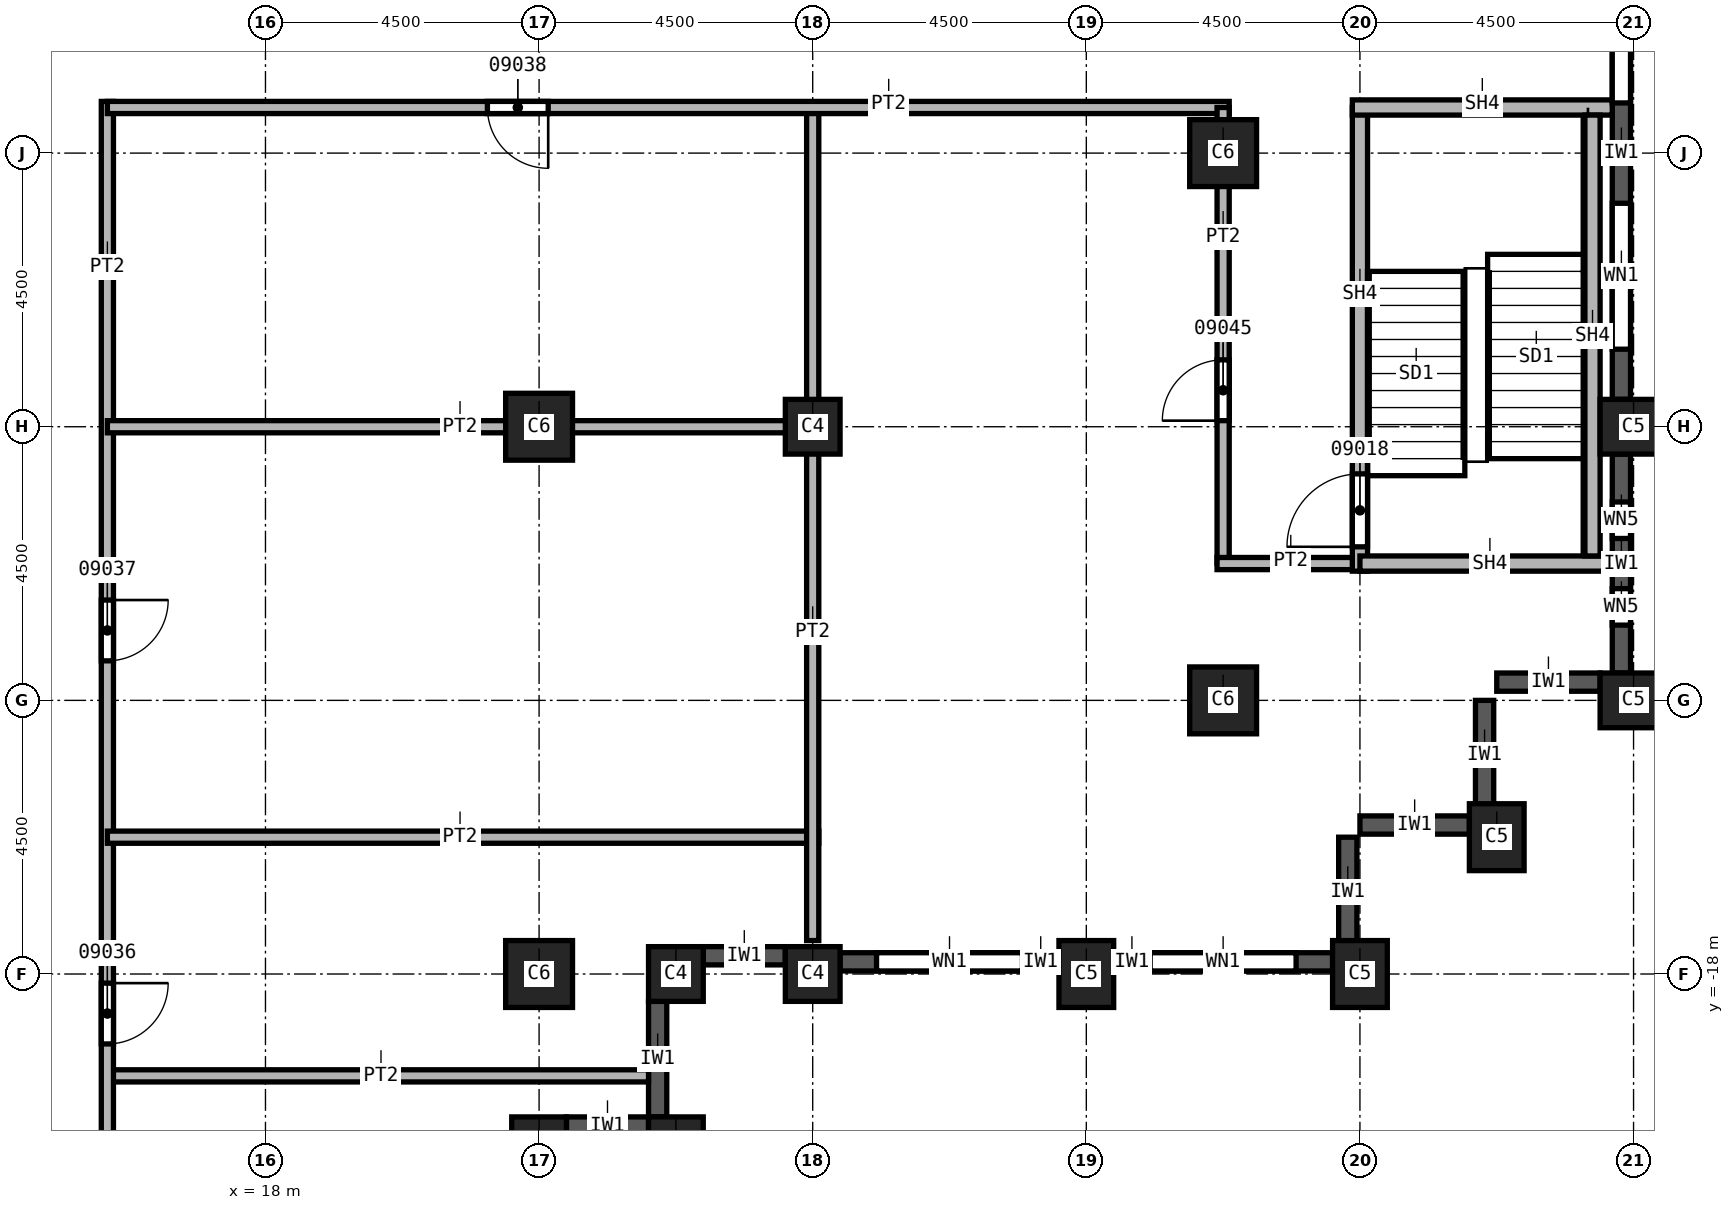
"""IFC4 building model, lengths in metres.
Left out: names, types, materials, properties, quantities, classifications, styles, units other than length and angle.
Written with IfcOpenShell. Run it as: python <this file> out.ifc"""

import sys

from ifc_helpers import new_model, si_unit, direction, frame, frame_2d, origin, origin_2d, place, context, subcontext, project, spatial, rectangle, extrude, element, fill, save


model = new_model("IFC4")
c1 = context("Model", 3, precision=1e-05, world=origin(), true_north=direction((0.0, 1.0)))
c2 = subcontext(c1, "Body", "Model", "MODEL_VIEW")
j1 = project(units=[si_unit("LENGTHUNIT", "METRE"), si_unit("PLANEANGLEUNIT", "RADIAN")], contexts=[c1])
p1 = place(None, origin())
s1 = spatial("IfcSite", under=j1, at=p1, CompositionType="ELEMENT")
p2 = place(p1, origin())
s2 = spatial("IfcBuilding", under=s1, at=p2, CompositionType="ELEMENT")
p3 = place(p2, frame((0.0, 0.0, 166.0)))
s3 = spatial("IfcBuildingStorey", under=s2, at=p3, CompositionType="ELEMENT", Elevation=166.0)
for number, where, z_axis, x_axis in (
    (1, (40.5, -9.0, 0.0), (0.0, 0.0, 1.0), (0.0, 1.0, 0.0)),
    (2, (40.5, -13.5, 0.0), (0.0, 0.0, 1.0), (0.0, 1.0, 0.0)),
    (3, (38.25, -15.75, 0.0), (0.0, 0.0, 1.0), (1.0, 0.0, 0.0)),
    (4, (31.5, -18.0, 0.0), (0.0, 0.0, 1.0), (1.0, 0.0, 0.0)),
    (5, (36.0, -18.0, 0.0), (0.0, 0.0, 1.0), (1.0, 0.0, 0.0)),
):
    element("IfcColumn", number, at=place(p3, frame(where, z_axis=z_axis, x_axis=x_axis)), inside=s3, PredefinedType="COLUMN", context=c2, shape_type="SweptSolid", body=[
        extrude(rectangle(XDim=0.9, YDim=1.1, at=origin_2d()), origin(), (0.0, 0.0, 1.0), 3.7),
    ])
for number, where, z_axis, x_axis in (
    (6, (33.75, -4.5, 0.0), (0.0, 0.0, 1.0), (1.0, 0.0, 0.0)),
    (7, (33.75, -13.5, 0.0), (0.0, 0.0, 1.0), (1.0, 0.0, 0.0)),
    (8, (22.5, -9.0, 0.0), (0.0, 0.0, 1.0), (1.0, 0.0, 0.0)),
    (9, (22.5, -18.0, 0.0), (0.0, 0.0, 1.0), (1.0, 0.0, 0.0)),
):
    element("IfcColumn", number, at=place(p3, frame(where, z_axis=z_axis, x_axis=x_axis)), inside=s3, PredefinedType="COLUMN", context=c2, shape_type="SweptSolid", body=[
        extrude(rectangle(XDim=1.1, YDim=1.1, at=origin_2d()), origin(), (0.0, 0.0, 1.0), 3.7),
    ])
for number, where, z_axis, x_axis in (
    (10, (27.0, -9.0, 0.0), (0.0, 0.0, 1.0), (1.0, 0.0, 0.0)),
    (11, (27.0, -18.0, 0.0), (0.0, 0.0, 1.0), (1.0, 0.0, 0.0)),
    (12, (22.5, -20.8, 0.0), (0.0, 0.0, 1.0), (1.0, 0.0, 0.0)),
    (13, (24.75, -20.8, 0.0), (0.0, 0.0, 1.0), (1.0, 0.0, 0.0)),
    (14, (24.75, -18.0, 0.0), (0.0, 0.0, 1.0), (1.0, 0.0, 0.0)),
):
    element("IfcColumn", number, at=place(p3, frame(where, z_axis=z_axis, x_axis=x_axis)), inside=s3, PredefinedType="COLUMN", context=c2, shape_type="SweptSolid", body=[
        extrude(rectangle(XDim=0.9, YDim=0.9, at=origin_2d()), origin(), (0.0, 0.0, 1.0), 3.7),
    ])
for number, where, z_axis, x_axis in (
    (15, (35.8, -17.55, 0.0), (0.0, 0.0, 1.0), (0.0, 1.0, 0.0)),
    (16, (37.8, -15.55, 0.0), (0.0, 0.0, 1.0), (-1.0, 0.0, 0.0)),
    (17, (38.05, -15.3, 0.0), (0.0, 0.0, 1.0), (0.0, 1.0, 0.0)),
):
    element("IfcWall", number, at=place(p3, frame(where, z_axis=z_axis, x_axis=x_axis)), inside=s3, PredefinedType="SOLIDWALL", context=c2, shape_type="SweptSolid", body=[
        extrude(rectangle(XDim=1.8, YDim=0.3, at=frame_2d((0.9, 0.0))), origin(), (0.0, 0.0, 1.0), 3.1),
    ])
p4 = place(p3, frame((39.95, -13.2, 0.0), z_axis=(0.0, 0.0, 1.0), x_axis=(-1.0, 0.0, 0.0)))
e18 = element("IfcWall", 18, at=p4, inside=s3, PredefinedType="SOLIDWALL", context=c2, shape_type="SweptSolid", body=[
    extrude(rectangle(XDim=1.7, YDim=0.3, at=frame_2d((0.85, 0.0))), origin(), (0.0, 0.0, 1.0), 3.1),
])
p5 = place(p3, frame((22.95, -20.5, 0.0), z_axis=(0.0, 0.0, 1.0), x_axis=(1.0, 0.0, 0.0)))
e19 = element("IfcWall", 19, at=p5, inside=s3, PredefinedType="SOLIDWALL", context=c2, shape_type="SweptSolid", body=[
    extrude(rectangle(XDim=1.35, YDim=0.3, at=frame_2d((0.675, 0.0))), origin(), (0.0, 0.0, 1.0), 3.1),
])
p6 = place(p3, frame((24.45, -20.35, 0.0), z_axis=(0.0, 0.0, 1.0), x_axis=(0.0, 1.0, 0.0)))
e20 = element("IfcWall", 20, at=p6, inside=s3, PredefinedType="SOLIDWALL", context=c2, shape_type="SweptSolid", body=[
    extrude(rectangle(XDim=1.9, YDim=0.3, at=frame_2d((0.95, 0.0))), origin(), (0.0, 0.0, 1.0), 3.1),
])
p7 = place(p3, frame((25.2, -17.7, 0.0), z_axis=(0.0, 0.0, 1.0), x_axis=(1.0, 0.0, 0.0)))
e21 = element("IfcWall", 21, at=p7, inside=s3, PredefinedType="SOLIDWALL", context=c2, shape_type="SweptSolid", body=[
    extrude(rectangle(XDim=1.35, YDim=0.3, at=frame_2d((0.675, 0.0))), origin(), (0.0, 0.0, 1.0), 3.1),
])
p8 = place(p3, frame((27.45, -17.8, 0.0), z_axis=(0.0, 0.0, 1.0), x_axis=(1.0, 0.0, 0.0)))
e22 = element("IfcWall", 22, at=p8, inside=s3, PredefinedType="SOLIDWALL", context=c2, shape_type="SweptSolid", body=[
    extrude(rectangle(XDim=3.6, YDim=0.3, at=frame_2d((1.8, 0.0))), origin(), (0.0, 0.0, 1.0), 3.1),
])
p9 = place(p8, frame((0.6, 0.0, 0.8)))
e23 = element("IfcOpeningElement", 23, at=p9, cuts=e22, PredefinedType="OPENING", context=c2, shape_type="SweptSolid", body=[
    extrude(rectangle(XDim=2.4, YDim=1.95, at=frame_2d((1.2, 0.975))), frame((0.0, 0.15, 0.0), z_axis=(0.0, -1.0, 0.0), x_axis=(1.0, 0.0, 0.0)), (0.0, 0.0, 1.0), 0.3),
])
p10 = place(p3, frame((31.95, -17.8, 0.0), z_axis=(0.0, 0.0, 1.0), x_axis=(1.0, 0.0, 0.0)))
e24 = element("IfcWall", 24, at=p10, inside=s3, PredefinedType="SOLIDWALL", context=c2, shape_type="SweptSolid", body=[
    extrude(rectangle(XDim=3.6, YDim=0.3, at=frame_2d((1.8, 0.0))), origin(), (0.0, 0.0, 1.0), 3.1),
])
p11 = place(p10, frame((0.6, 0.0, 0.8)))
e25 = element("IfcOpeningElement", 25, at=p11, cuts=e24, PredefinedType="OPENING", context=c2, shape_type="SweptSolid", body=[
    extrude(rectangle(XDim=2.4, YDim=1.95, at=frame_2d((1.2, 0.975))), frame((0.0, 0.15, 0.0), z_axis=(0.0, -1.0, 0.0), x_axis=(1.0, 0.0, 0.0)), (0.0, 0.0, 1.0), 0.3),
])
p12 = place(p3, frame((40.3, -13.05, 0.0), z_axis=(0.0, 0.0, 1.0), x_axis=(0.0, 1.0, 0.0)))
e26 = element("IfcWall", 26, at=p12, inside=s3, PredefinedType="SOLIDWALL", context=c2, shape_type="SweptSolid", body=[
    extrude(rectangle(XDim=3.6, YDim=0.3, at=frame_2d((1.8, 0.0))), origin(), (0.0, 0.0, 1.0), 3.1),
])
p13 = place(p12, frame((0.788, 0.0, 0.8)))
e27 = element("IfcOpeningElement", 27, at=p13, cuts=e26, PredefinedType="OPENING", context=c2, shape_type="SweptSolid", body=[
    extrude(rectangle(XDim=0.6, YDim=1.95, at=frame_2d((0.3, 0.975))), frame((0.0, 0.15, 0.0), z_axis=(0.0, -1.0, 0.0), x_axis=(1.0, 0.0, 0.0)), (0.0, 0.0, 1.0), 0.3),
])
p14 = place(p12, frame((2.212, 0.0, 0.8)))
e28 = element("IfcOpeningElement", 28, at=p14, cuts=e26, PredefinedType="OPENING", context=c2, shape_type="SweptSolid", body=[
    extrude(rectangle(XDim=0.6, YDim=1.95, at=frame_2d((0.3, 0.975))), frame((0.0, 0.15, 0.0), z_axis=(0.0, -1.0, 0.0), x_axis=(1.0, 0.0, 0.0)), (0.0, 0.0, 1.0), 0.3),
])
p15 = place(p3, frame((40.3, -8.55, 0.0), z_axis=(0.0, 0.0, 1.0), x_axis=(0.0, 1.0, 0.0)))
e29 = element("IfcWall", 29, at=p15, inside=s3, PredefinedType="SOLIDWALL", context=c2, shape_type="SweptSolid", body=[
    extrude(rectangle(XDim=8.1, YDim=0.3, at=frame_2d((4.05, 0.0))), origin(), (0.0, 0.0, 1.0), 3.1),
])
p16 = place(p15, frame((0.825, 0.0, 0.8)))
e30 = element("IfcOpeningElement", 30, at=p16, cuts=e29, PredefinedType="OPENING", context=c2, shape_type="SweptSolid", body=[
    extrude(rectangle(XDim=2.4, YDim=1.95, at=frame_2d((1.2, 0.975))), frame((0.0, 0.15, 0.0), z_axis=(0.0, -1.0, 0.0), x_axis=(1.0, 0.0, 0.0)), (0.0, 0.0, 1.0), 0.3),
])
p17 = place(p15, frame((4.875, 0.0, 0.8)))
e31 = element("IfcOpeningElement", 31, at=p17, cuts=e29, PredefinedType="OPENING", context=c2, shape_type="SweptSolid", body=[
    extrude(rectangle(XDim=2.4, YDim=1.95, at=frame_2d((1.2, 0.975))), frame((0.0, 0.15, 0.0), z_axis=(0.0, -1.0, 0.0), x_axis=(1.0, 0.0, 0.0)), (0.0, 0.0, 1.0), 0.3),
])
p18 = place(p3, frame((15.4, -19.675, 0.0), z_axis=(0.0, 0.0, 1.0), x_axis=(1.0, 0.0, 0.0)))
e32 = element("IfcWall", 32, at=p18, inside=s3, PredefinedType="PARTITIONING", context=c2, shape_type="SweptSolid", body=[
    extrude(rectangle(XDim=8.9, YDim=0.2, at=frame_2d((4.45, 0.0))), origin(), (0.0, 0.0, 1.0), 3.7),
])
p19 = place(p3, frame((15.4, -3.65, 0.0), z_axis=(0.0, 0.0, 1.0), x_axis=(0.0, -1.0, 0.0)))
e33 = element("IfcWall", 33, at=p19, inside=s3, PredefinedType="PARTITIONING", context=c2, shape_type="SweptSolid", body=[
    extrude(rectangle(XDim=19.6, YDim=0.2, at=frame_2d((9.8, 0.0))), origin(), (0.0, 0.0, 1.0), 3.7),
])
p20 = place(p19, frame((18.275, 0.0, 0.0)))
e34 = element("IfcOpeningElement", 34, at=p20, cuts=e33, PredefinedType="OPENING", context=c2, shape_type="SweptSolid", body=[
    extrude(rectangle(XDim=1.0, YDim=2.1, at=frame_2d((0.5, 1.05))), frame((0.0, 0.1, 0.0), z_axis=(0.0, -1.0, 0.0), x_axis=(1.0, 0.0, 0.0)), (0.0, 0.0, 1.0), 0.2),
])
p21 = place(p19, frame((14.5, 0.0, 0.0)))
e35 = element("IfcOpeningElement", 35, at=p21, cuts=e33, PredefinedType="OPENING", context=c2, shape_type="SweptSolid", body=[
    extrude(rectangle(XDim=1.0, YDim=2.1, at=frame_2d((0.5, 1.05))), frame((0.0, 0.1, 0.0), z_axis=(0.0, -1.0, 0.0), x_axis=(1.0, 0.0, 0.0)), (0.0, 0.0, 1.0), 0.2),
])
p22 = place(p19, frame((8.2, 0.0, 0.0)))
e36 = element("IfcOpeningElement", 36, at=p22, cuts=e33, PredefinedType="OPENING", context=c2, shape_type="SweptSolid", body=[
    extrude(rectangle(XDim=1.0, YDim=2.1, at=frame_2d((0.5, 1.05))), frame((0.0, 0.1, 0.0), z_axis=(0.0, -1.0, 0.0), x_axis=(1.0, 0.0, 0.0)), (0.0, 0.0, 1.0), 0.2),
])
for number, where, z_axis, x_axis in (
    (37, (15.4, -15.75, 0.0), (0.0, 0.0, 1.0), (1.0, 0.0, 0.0)),
    (38, (15.4, -9.0, 0.0), (0.0, 0.0, 1.0), (1.0, 0.0, 0.0)),
):
    element("IfcWall", number, at=place(p3, frame(where, z_axis=z_axis, x_axis=x_axis)), inside=s3, PredefinedType="PARTITIONING", context=c2, shape_type="SweptSolid", body=[
        extrude(rectangle(XDim=11.7, YDim=0.2, at=frame_2d((5.85, 0.0))), origin(), (0.0, 0.0, 1.0), 3.7),
    ])
p23 = place(p3, frame((27.0, -3.75, 0.0), z_axis=(0.0, 0.0, 1.0), x_axis=(0.0, -1.0, 0.0)))
e39 = element("IfcWall", 39, at=p23, inside=s3, PredefinedType="PARTITIONING", context=c2, shape_type="SweptSolid", body=[
    extrude(rectangle(XDim=13.7, YDim=0.2, at=frame_2d((6.85, 0.0))), origin(), (0.0, 0.0, 1.0), 3.7),
])
p24 = place(p3, frame((33.85, -3.75, 0.0), z_axis=(0.0, 0.0, 1.0), x_axis=(-1.0, 0.0, 0.0)))
e40 = element("IfcWall", 40, at=p24, inside=s3, PredefinedType="PARTITIONING", context=c2, shape_type="SweptSolid", body=[
    extrude(rectangle(XDim=18.45, YDim=0.2, at=frame_2d((9.225, 0.0))), origin(), (0.0, 0.0, 1.0), 3.7),
])
p25 = place(p24, frame((11.2, 0.0, 0.0)))
e41 = element("IfcOpeningElement", 41, at=p25, cuts=e40, PredefinedType="OPENING", context=c2, shape_type="SweptSolid", body=[
    extrude(rectangle(XDim=1.0, YDim=2.1, at=frame_2d((0.5, 1.05))), frame((0.0, 0.1, 0.0), z_axis=(0.0, -1.0, 0.0), x_axis=(1.0, 0.0, 0.0)), (0.0, 0.0, 1.0), 0.2),
])
p26 = place(p3, frame((33.75, -11.25, 0.0), z_axis=(0.0, 0.0, 1.0), x_axis=(0.0, 1.0, 0.0)))
e42 = element("IfcWall", 42, at=p26, inside=s3, PredefinedType="PARTITIONING", context=c2, shape_type="SweptSolid", body=[
    extrude(rectangle(XDim=7.5, YDim=0.2, at=frame_2d((3.75, 0.0))), origin(), (0.0, 0.0, 1.0), 3.7),
])
p27 = place(p26, frame((2.35, 0.0, 0.0)))
e43 = element("IfcOpeningElement", 43, at=p27, cuts=e42, PredefinedType="OPENING", context=c2, shape_type="SweptSolid", body=[
    extrude(rectangle(XDim=1.0, YDim=2.1, at=frame_2d((0.5, 1.05))), frame((0.0, 0.1, 0.0), z_axis=(0.0, -1.0, 0.0), x_axis=(1.0, 0.0, 0.0)), (0.0, 0.0, 1.0), 0.2),
])
p28 = place(p3, frame((36.0, -11.25, 0.0), z_axis=(0.0, 0.0, 1.0), x_axis=(-1.0, 0.0, 0.0)))
e44 = element("IfcWall", 44, at=p28, inside=s3, PredefinedType="PARTITIONING", context=c2, shape_type="SweptSolid", body=[
    extrude(rectangle(XDim=2.35, YDim=0.2, at=frame_2d((1.175, 0.0))), origin(), (0.0, 0.0, 1.0), 3.7),
])
p29 = place(p3, frame((36.0, -11.375, 0.0), z_axis=(0.0, 0.0, 1.0), x_axis=(0.0, 1.0, 0.0)))
e45 = element("IfcWall", 45, at=p29, inside=s3, PredefinedType="SOLIDWALL", context=c2, shape_type="SweptSolid", body=[
    extrude(rectangle(XDim=7.625, YDim=0.25, at=frame_2d((3.812, 0.0))), origin(), (0.0, 0.0, 1.0), 3.7),
])
p30 = place(p29, frame((0.4, 0.0, 0.0)))
e46 = element("IfcOpeningElement", 46, at=p30, cuts=e45, PredefinedType="OPENING", context=c2, shape_type="SweptSolid", body=[
    extrude(rectangle(XDim=1.2, YDim=2.1, at=frame_2d((0.6, 1.05))), frame((0.0, 0.125, 0.0), z_axis=(0.0, -1.0, 0.0), x_axis=(1.0, 0.0, 0.0)), (0.0, 0.0, 1.0), 0.25),
])
p31 = place(p3, frame((40.15, -11.25, 0.0), z_axis=(0.0, 0.0, 1.0), x_axis=(-1.0, 0.0, 0.0)))
e47 = element("IfcWall", 47, at=p31, inside=s3, PredefinedType="SOLIDWALL", context=c2, shape_type="SweptSolid", body=[
    extrude(rectangle(XDim=4.15, YDim=0.25, at=frame_2d((2.075, 0.0))), origin(), (0.0, 0.0, 1.0), 3.7),
])
p32 = place(p3, frame((40.15, -3.75, 0.0), z_axis=(0.0, 0.0, 1.0), x_axis=(-1.0, 0.0, 0.0)))
e48 = element("IfcWall", 48, at=p32, inside=s3, PredefinedType="SOLIDWALL", context=c2, shape_type="SweptSolid", body=[
    extrude(rectangle(XDim=4.275, YDim=0.25, at=frame_2d((2.137, 0.0))), origin(), (0.0, 0.0, 1.0), 3.7),
])
p33 = place(p3, frame((39.825, -11.125, 0.0), z_axis=(0.0, 0.0, 1.0), x_axis=(0.0, 1.0, 0.0)))
e49 = element("IfcWall", 49, at=p33, inside=s3, PredefinedType="SOLIDWALL", context=c2, shape_type="SweptSolid", body=[
    extrude(rectangle(XDim=7.25, YDim=0.25, at=frame_2d((3.625, 0.0))), origin(), (0.0, 0.0, 1.0), 3.7),
])
p34 = place(p9, origin())
e50 = element("IfcWindow", 50, at=p34, inside=s3, PartitioningType="SINGLE_PANEL", PredefinedType="WINDOW", context=c2, shape_type="SweptSolid", body=[
    extrude(rectangle(XDim=2.4, YDim=1.95, at=frame_2d((1.2, 0.975))), frame((0.0, 0.03, 0.0), z_axis=(0.0, -1.0, 0.0), x_axis=(1.0, 0.0, 0.0)), (0.0, 0.0, 1.0), 0.06),
])
fill(e23, e50)
p35 = place(p11, origin())
e51 = element("IfcWindow", 51, at=p35, inside=s3, PartitioningType="SINGLE_PANEL", PredefinedType="WINDOW", context=c2, shape_type="SweptSolid", body=[
    extrude(rectangle(XDim=2.4, YDim=1.95, at=frame_2d((1.2, 0.975))), frame((0.0, 0.03, 0.0), z_axis=(0.0, -1.0, 0.0), x_axis=(1.0, 0.0, 0.0)), (0.0, 0.0, 1.0), 0.06),
])
fill(e25, e51)
p36 = place(p16, origin())
e52 = element("IfcWindow", 52, at=p36, inside=s3, PartitioningType="SINGLE_PANEL", PredefinedType="WINDOW", context=c2, shape_type="SweptSolid", body=[
    extrude(rectangle(XDim=2.4, YDim=1.95, at=frame_2d((1.2, 0.975))), frame((0.0, 0.03, 0.0), z_axis=(0.0, -1.0, 0.0), x_axis=(1.0, 0.0, 0.0)), (0.0, 0.0, 1.0), 0.06),
])
fill(e30, e52)
p37 = place(p17, origin())
e53 = element("IfcWindow", 53, at=p37, inside=s3, PartitioningType="SINGLE_PANEL", PredefinedType="WINDOW", context=c2, shape_type="SweptSolid", body=[
    extrude(rectangle(XDim=2.4, YDim=1.95, at=frame_2d((1.2, 0.975))), frame((0.0, 0.03, 0.0), z_axis=(0.0, -1.0, 0.0), x_axis=(1.0, 0.0, 0.0)), (0.0, 0.0, 1.0), 0.06),
])
fill(e31, e53)
p38 = place(p30, origin())
e54 = element("IfcDoor", 54, at=p38, inside=s3, OperationType="SINGLE_SWING_LEFT", PredefinedType="DOOR", context=c2, shape_type="SweptSolid", body=[
    extrude(rectangle(XDim=1.2, YDim=2.1, at=frame_2d((0.6, 1.05))), frame((0.0, 0.025, 0.0), z_axis=(0.0, -1.0, 0.0), x_axis=(1.0, 0.0, 0.0)), (0.0, 0.0, 1.0), 0.05),
])
fill(e46, e54)
p39 = place(p21, origin())
e55 = element("IfcDoor", 55, at=p39, inside=s3, OperationType="SINGLE_SWING_LEFT", PredefinedType="DOOR", context=c2, shape_type="SweptSolid", body=[
    extrude(rectangle(XDim=1.0, YDim=2.1, at=frame_2d((0.5, 1.05))), frame((0.0, 0.025, 0.0), z_axis=(0.0, -1.0, 0.0), x_axis=(1.0, 0.0, 0.0)), (0.0, 0.0, 1.0), 0.05),
])
fill(e35, e55)
p40 = place(p22, origin())
e56 = element("IfcDoor", 56, at=p40, inside=s3, OperationType="SINGLE_SWING_RIGHT", PredefinedType="DOOR", context=c2, shape_type="SweptSolid", body=[
    extrude(rectangle(XDim=1.0, YDim=2.1, at=frame_2d((0.5, 1.05))), frame((0.0, 0.025, 0.0), z_axis=(0.0, -1.0, 0.0), x_axis=(1.0, 0.0, 0.0)), (0.0, 0.0, 1.0), 0.05),
])
fill(e36, e56)
p41 = place(p25, origin())
e57 = element("IfcDoor", 57, at=p41, inside=s3, OperationType="SINGLE_SWING_LEFT", PredefinedType="DOOR", context=c2, shape_type="SweptSolid", body=[
    extrude(rectangle(XDim=1.0, YDim=2.1, at=frame_2d((0.5, 1.05))), frame((0.0, 0.025, 0.0), z_axis=(0.0, -1.0, 0.0), x_axis=(1.0, 0.0, 0.0)), (0.0, 0.0, 1.0), 0.05),
])
fill(e41, e57)
p42 = place(p27, origin())
e58 = element("IfcDoor", 58, at=p42, inside=s3, OperationType="SINGLE_SWING_RIGHT", PredefinedType="DOOR", context=c2, shape_type="SweptSolid", body=[
    extrude(rectangle(XDim=1.0, YDim=2.1, at=frame_2d((0.5, 1.05))), frame((0.0, 0.025, 0.0), z_axis=(0.0, -1.0, 0.0), x_axis=(1.0, 0.0, 0.0)), (0.0, 0.0, 1.0), 0.05),
])
fill(e43, e58)
p43 = place(p13, origin())
e59 = element("IfcWindow", 59, at=p43, inside=s3, PartitioningType="SINGLE_PANEL", PredefinedType="WINDOW", context=c2, shape_type="SweptSolid", body=[
    extrude(rectangle(XDim=0.6, YDim=1.95, at=frame_2d((0.3, 0.975))), frame((0.0, 0.03, 0.0), z_axis=(0.0, -1.0, 0.0), x_axis=(1.0, 0.0, 0.0)), (0.0, 0.0, 1.0), 0.06),
])
fill(e27, e59)
p44 = place(p14, origin())
e60 = element("IfcWindow", 60, at=p44, inside=s3, PartitioningType="SINGLE_PANEL", PredefinedType="WINDOW", context=c2, shape_type="SweptSolid", body=[
    extrude(rectangle(XDim=0.6, YDim=1.95, at=frame_2d((0.3, 0.975))), frame((0.0, 0.03, 0.0), z_axis=(0.0, -1.0, 0.0), x_axis=(1.0, 0.0, 0.0)), (0.0, 0.0, 1.0), 0.06),
])
fill(e28, e60)
save(model, sys.argv[1])
